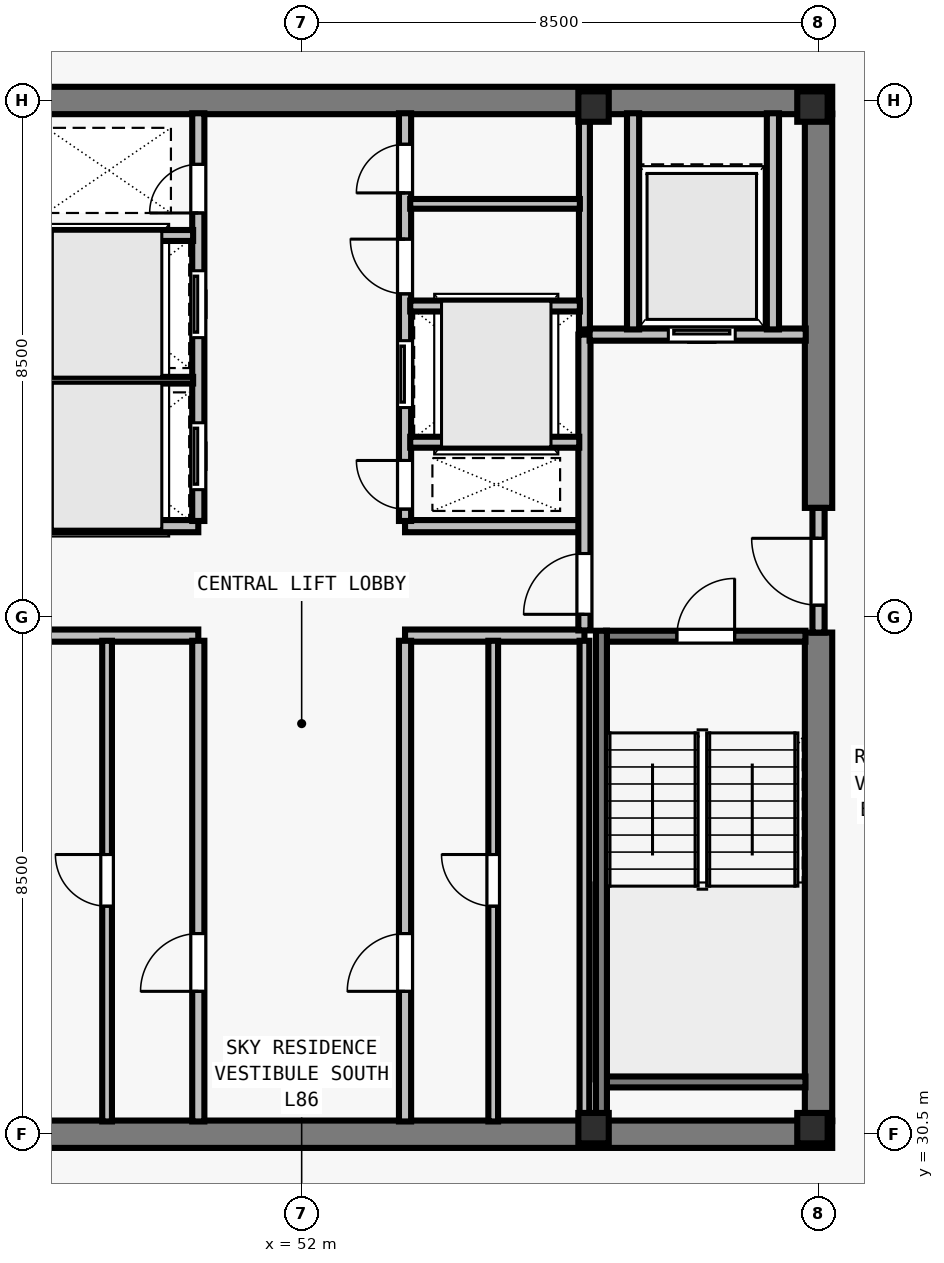
"""IFC4 building model, lengths in metres.
Left out: names, types, materials, properties, quantities, classifications, styles, units other than length and angle.
Written with IfcOpenShell. Run it as: python <this file> out.ifc"""

import sys

from ifc_helpers import new_model, si_unit, direction, frame, frame_2d, origin, origin_2d, place, context, subcontext, project, spatial, rectangle, i_section, extrude, element, fill, save


model = new_model("IFC4")
c1 = context("Model", 3, precision=1e-05, world=origin(), true_north=direction((0.0, 1.0)))
c2 = subcontext(c1, "Body", "Model", "MODEL_VIEW")
j1 = project(units=[si_unit("LENGTHUNIT", "METRE"), si_unit("PLANEANGLEUNIT", "RADIAN")], contexts=[c1])
p1 = place(None, origin())
s1 = spatial("IfcSite", under=j1, at=p1, CompositionType="ELEMENT")
p2 = place(p1, origin())
s2 = spatial("IfcBuilding", under=s1, at=p2, CompositionType="ELEMENT")
p3 = place(p2, frame((0.0, 0.0, 312.0)))
s3 = spatial("IfcBuildingStorey", under=s2, at=p3, CompositionType="ELEMENT", Elevation=312.0)
for number, where, z_axis, x_axis in (
    (1, (56.8, 30.6, 0.0), (0.0, 0.0, 1.0), (1.0, 0.0, 0.0)),
    (2, (60.4, 30.6, 0.0), (0.0, 0.0, 1.0), (1.0, 0.0, 0.0)),
    (3, (56.8, 47.4, 0.0), (0.0, 0.0, 1.0), (1.0, 0.0, 0.0)),
    (4, (60.4, 47.4, 0.0), (0.0, 0.0, 1.0), (1.0, 0.0, 0.0)),
):
    element("IfcColumn", number, at=place(p3, frame(where, z_axis=z_axis, x_axis=x_axis)), inside=s3, PredefinedType="COLUMN", context=c2, shape_type="SweptSolid", body=[
        extrude(i_section(OverallWidth=0.5, OverallDepth=0.5, WebThickness=0.028, FlangeThickness=0.045, at=origin_2d()), origin(), (0.0, 0.0, 1.0), 3.5),
    ])
for number, where, z_axis, x_axis in (
    (5, (43.275, 30.5, 0.0), (0.0, 0.0, 1.0), (1.0, 0.0, 0.0)),
    (6, (43.275, 47.5, 0.0), (0.0, 0.0, 1.0), (1.0, 0.0, 0.0)),
):
    element("IfcWall", number, at=place(p3, frame(where, z_axis=z_axis, x_axis=x_axis)), inside=s3, PredefinedType="SHEAR", context=c2, shape_type="SweptSolid", body=[
        extrude(rectangle(XDim=17.45, YDim=0.45, at=frame_2d((8.725, 0.0))), origin(), (0.0, 0.0, 1.0), 3.29),
    ])
p4 = place(p3, frame((60.5, 30.715, 0.0), z_axis=(0.0, 0.0, 1.0), x_axis=(0.0, 1.0, 0.0)))
e7 = element("IfcWall", 7, at=p4, inside=s3, PredefinedType="SHEAR", context=c2, shape_type="SweptSolid", body=[
    extrude(rectangle(XDim=8.035, YDim=0.45, at=frame_2d((4.018, 0.0))), origin(), (0.0, 0.0, 1.0), 3.29),
])
p5 = place(p3, frame((60.5, 40.8, 0.0), z_axis=(0.0, 0.0, 1.0), x_axis=(0.0, 1.0, 0.0)))
e8 = element("IfcWall", 8, at=p5, inside=s3, PredefinedType="SHEAR", context=c2, shape_type="SweptSolid", body=[
    extrude(rectangle(XDim=6.485, YDim=0.45, at=frame_2d((3.242, 0.0))), origin(), (0.0, 0.0, 1.0), 3.29),
])
for number, where, z_axis, x_axis in (
    (9, (47.35, 38.7, 0.0), (0.0, 0.0, 1.0), (1.0, 0.0, 0.0)),
    (10, (47.35, 40.5, 0.0), (0.0, 0.0, 1.0), (1.0, 0.0, 0.0)),
    (11, (53.7, 38.7, 0.0), (0.0, 0.0, 1.0), (1.0, 0.0, 0.0)),
    (12, (53.7, 40.5, 0.0), (0.0, 0.0, 1.0), (1.0, 0.0, 0.0)),
):
    element("IfcWall", number, at=place(p3, frame(where, z_axis=z_axis, x_axis=x_axis)), inside=s3, PredefinedType="SOLIDWALL", context=c2, shape_type="SweptSolid", body=[
        extrude(rectangle(XDim=2.95, YDim=0.2, at=frame_2d((1.475, 0.0))), origin(), (0.0, 0.0, 1.0), 3.29),
    ])
p6 = place(p3, frame((50.3, 30.71, 0.0), z_axis=(0.0, 0.0, 1.0), x_axis=(0.0, 1.0, 0.0)))
e13 = element("IfcWall", 13, at=p6, inside=s3, PredefinedType="SOLIDWALL", context=c2, shape_type="SweptSolid", body=[
    extrude(rectangle(XDim=7.905, YDim=0.2, at=frame_2d((3.953, 0.0))), origin(), (0.0, 0.0, 1.0), 3.29),
])
p7 = place(p6, frame((2.14, 0.0, 0.0)))
e14 = element("IfcOpeningElement", 14, at=p7, cuts=e13, PredefinedType="OPENING", context=c2, shape_type="SweptSolid", body=[
    extrude(rectangle(XDim=0.95, YDim=2.12, at=frame_2d((0.475, 1.06))), frame((0.0, 0.11, 0.0), z_axis=(0.0, -1.0, 0.0), x_axis=(1.0, 0.0, 0.0)), (0.0, 0.0, 1.0), 0.22),
])
p8 = place(p3, frame((53.7, 30.71, 0.0), z_axis=(0.0, 0.0, 1.0), x_axis=(0.0, 1.0, 0.0)))
e15 = element("IfcWall", 15, at=p8, inside=s3, PredefinedType="SOLIDWALL", context=c2, shape_type="SweptSolid", body=[
    extrude(rectangle(XDim=7.905, YDim=0.2, at=frame_2d((3.953, 0.0))), origin(), (0.0, 0.0, 1.0), 3.29),
])
p9 = place(p8, frame((2.14, 0.0, 0.0)))
e16 = element("IfcOpeningElement", 16, at=p9, cuts=e15, PredefinedType="OPENING", context=c2, shape_type="SweptSolid", body=[
    extrude(rectangle(XDim=0.95, YDim=2.12, at=frame_2d((0.475, 1.06))), frame((0.0, 0.11, 0.0), z_axis=(0.0, -1.0, 0.0), x_axis=(1.0, 0.0, 0.0)), (0.0, 0.0, 1.0), 0.22),
])
p10 = place(p3, frame((50.3, 40.585, 0.0), z_axis=(0.0, 0.0, 1.0), x_axis=(0.0, 1.0, 0.0)))
e17 = element("IfcWall", 17, at=p10, inside=s3, PredefinedType="SOLIDWALL", context=c2, shape_type="SweptSolid", body=[
    extrude(rectangle(XDim=6.705, YDim=0.2, at=frame_2d((3.353, 0.0))), origin(), (0.0, 0.0, 1.0), 3.29),
])
p11 = place(p10, frame((0.515, 0.0, 0.0)))
e18 = element("IfcOpeningElement", 18, at=p11, cuts=e17, PredefinedType="OPENING", context=c2, shape_type="SweptSolid", body=[
    extrude(rectangle(XDim=1.1, YDim=2.2, at=frame_2d((0.55, 1.1))), frame((0.0, 0.11, 0.0), z_axis=(0.0, -1.0, 0.0), x_axis=(1.0, 0.0, 0.0)), (0.0, 0.0, 1.0), 0.22),
])
p12 = place(p10, frame((3.015, 0.0, 0.0)))
e19 = element("IfcOpeningElement", 19, at=p12, cuts=e17, PredefinedType="OPENING", context=c2, shape_type="SweptSolid", body=[
    extrude(rectangle(XDim=1.1, YDim=2.2, at=frame_2d((0.55, 1.1))), frame((0.0, 0.11, 0.0), z_axis=(0.0, -1.0, 0.0), x_axis=(1.0, 0.0, 0.0)), (0.0, 0.0, 1.0), 0.22),
])
p13 = place(p10, frame((5.065, 0.0, 0.0)))
e20 = element("IfcOpeningElement", 20, at=p13, cuts=e17, PredefinedType="OPENING", context=c2, shape_type="SweptSolid", body=[
    extrude(rectangle(XDim=0.8, YDim=2.08, at=frame_2d((0.4, 1.04))), frame((0.0, 0.11, 0.0), z_axis=(0.0, -1.0, 0.0), x_axis=(1.0, 0.0, 0.0)), (0.0, 0.0, 1.0), 0.22),
])
p14 = place(p3, frame((53.7, 40.585, 0.0), z_axis=(0.0, 0.0, 1.0), x_axis=(0.0, 1.0, 0.0)))
e21 = element("IfcWall", 21, at=p14, inside=s3, PredefinedType="SOLIDWALL", context=c2, shape_type="SweptSolid", body=[
    extrude(rectangle(XDim=6.705, YDim=0.2, at=frame_2d((3.353, 0.0))), origin(), (0.0, 0.0, 1.0), 3.29),
])
p15 = place(p14, frame((0.195, 0.0, 0.0)))
e22 = element("IfcOpeningElement", 22, at=p15, cuts=e21, PredefinedType="OPENING", context=c2, shape_type="SweptSolid", body=[
    extrude(rectangle(XDim=0.8, YDim=2.08, at=frame_2d((0.4, 1.04))), frame((0.0, 0.11, 0.0), z_axis=(0.0, -1.0, 0.0), x_axis=(1.0, 0.0, 0.0)), (0.0, 0.0, 1.0), 0.22),
])
p16 = place(p14, frame((1.865, 0.0, 0.0)))
e23 = element("IfcOpeningElement", 23, at=p16, cuts=e21, PredefinedType="OPENING", context=c2, shape_type="SweptSolid", body=[
    extrude(rectangle(XDim=1.1, YDim=2.2, at=frame_2d((0.55, 1.1))), frame((0.0, 0.11, 0.0), z_axis=(0.0, -1.0, 0.0), x_axis=(1.0, 0.0, 0.0)), (0.0, 0.0, 1.0), 0.22),
])
p17 = place(p14, frame((3.735, 0.0, 0.0)))
e24 = element("IfcOpeningElement", 24, at=p17, cuts=e21, PredefinedType="OPENING", context=c2, shape_type="SweptSolid", body=[
    extrude(rectangle(XDim=0.9, YDim=2.12, at=frame_2d((0.45, 1.06))), frame((0.0, 0.11, 0.0), z_axis=(0.0, -1.0, 0.0), x_axis=(1.0, 0.0, 0.0)), (0.0, 0.0, 1.0), 0.22),
])
p18 = place(p14, frame((5.395, 0.0, 0.0)))
e25 = element("IfcOpeningElement", 25, at=p18, cuts=e21, PredefinedType="OPENING", context=c2, shape_type="SweptSolid", body=[
    extrude(rectangle(XDim=0.8, YDim=2.1, at=frame_2d((0.4, 1.05))), frame((0.0, 0.11, 0.0), z_axis=(0.0, -1.0, 0.0), x_axis=(1.0, 0.0, 0.0)), (0.0, 0.0, 1.0), 0.22),
])
p19 = place(p3, frame((60.5, 38.75, 0.0), z_axis=(0.0, 0.0, 1.0), x_axis=(0.0, 1.0, 0.0)))
e26 = element("IfcWall", 26, at=p19, inside=s3, PredefinedType="SOLIDWALL", context=c2, shape_type="SweptSolid", body=[
    extrude(rectangle(XDim=2.05, YDim=0.2, at=frame_2d((1.025, 0.0))), origin(), (0.0, 0.0, 1.0), 3.29),
])
p20 = place(p19, frame((0.45, 0.0, 0.0)))
e27 = element("IfcOpeningElement", 27, at=p20, cuts=e26, PredefinedType="OPENING", context=c2, shape_type="SweptSolid", body=[
    extrude(rectangle(XDim=1.1, YDim=2.15, at=frame_2d((0.55, 1.075))), frame((0.0, 0.11, 0.0), z_axis=(0.0, -1.0, 0.0), x_axis=(1.0, 0.0, 0.0)), (0.0, 0.0, 1.0), 0.22),
])
p21 = place(p3, frame((56.65, 38.785, 0.0), z_axis=(0.0, 0.0, 1.0), x_axis=(0.0, 1.0, 0.0)))
e28 = element("IfcWall", 28, at=p21, inside=s3, PredefinedType="SOLIDWALL", context=c2, shape_type="SweptSolid", body=[
    extrude(rectangle(XDim=4.865, YDim=0.2, at=frame_2d((2.433, 0.0))), origin(), (0.0, 0.0, 1.0), 3.29),
])
p22 = place(p21, frame((0.265, 0.0, 0.0)))
e29 = element("IfcOpeningElement", 29, at=p22, cuts=e28, PredefinedType="OPENING", context=c2, shape_type="SweptSolid", body=[
    extrude(rectangle(XDim=1.0, YDim=2.15, at=frame_2d((0.5, 1.075))), frame((0.0, 0.11, 0.0), z_axis=(0.0, -1.0, 0.0), x_axis=(1.0, 0.0, 0.0)), (0.0, 0.0, 1.0), 0.22),
])
p23 = place(p3, frame((56.735, 43.65, 0.0), z_axis=(0.0, 0.0, 1.0), x_axis=(1.0, 0.0, 0.0)))
e30 = element("IfcWall", 30, at=p23, inside=s3, PredefinedType="SOLIDWALL", context=c2, shape_type="SweptSolid", body=[
    extrude(rectangle(XDim=3.555, YDim=0.2, at=frame_2d((1.777, 0.0))), origin(), (0.0, 0.0, 1.0), 3.29),
])
p24 = place(p23, frame((1.295, 0.0, 0.0)))
e31 = element("IfcOpeningElement", 31, at=p24, cuts=e30, PredefinedType="OPENING", context=c2, shape_type="SweptSolid", body=[
    extrude(rectangle(XDim=1.1, YDim=2.2, at=frame_2d((0.55, 1.1))), frame((0.0, 0.11, 0.0), z_axis=(0.0, -1.0, 0.0), x_axis=(1.0, 0.0, 0.0)), (0.0, 0.0, 1.0), 0.22),
])
for number, where, z_axis, x_axis in (
    (32, (57.45, 43.735, 0.0), (0.0, 0.0, 1.0), (0.0, 1.0, 0.0)),
    (33, (59.75, 43.735, 0.0), (0.0, 0.0, 1.0), (0.0, 1.0, 0.0)),
):
    element("IfcWall", number, at=place(p3, frame(where, z_axis=z_axis, x_axis=x_axis)), inside=s3, PredefinedType="SOLIDWALL", context=c2, shape_type="SweptSolid", body=[
        extrude(rectangle(XDim=3.555, YDim=0.2, at=frame_2d((1.777, 0.0))), origin(), (0.0, 0.0, 1.0), 3.29),
    ])
p25 = place(p3, frame((48.8, 30.71, 0.0), z_axis=(0.0, 0.0, 1.0), x_axis=(0.0, 1.0, 0.0)))
e34 = element("IfcWall", 34, at=p25, inside=s3, PredefinedType="PARTITIONING", context=c2, shape_type="SweptSolid", body=[
    extrude(rectangle(XDim=7.905, YDim=0.16, at=frame_2d((3.953, 0.0))), origin(), (0.0, 0.0, 1.0), 3.29),
])
p26 = place(p25, frame((3.54, 0.0, 0.0)))
e35 = element("IfcOpeningElement", 35, at=p26, cuts=e34, PredefinedType="OPENING", context=c2, shape_type="SweptSolid", body=[
    extrude(rectangle(XDim=0.85, YDim=2.12, at=frame_2d((0.425, 1.06))), frame((0.0, 0.09, 0.0), z_axis=(0.0, -1.0, 0.0), x_axis=(1.0, 0.0, 0.0)), (0.0, 0.0, 1.0), 0.18),
])
p27 = place(p3, frame((56.65, 30.71, 0.0), z_axis=(0.0, 0.0, 1.0), x_axis=(0.0, 1.0, 0.0)))
e36 = element("IfcWall", 36, at=p27, inside=s3, PredefinedType="PARTITIONING", context=c2, shape_type="SweptSolid", body=[
    extrude(rectangle(XDim=7.905, YDim=0.16, at=frame_2d((3.953, 0.0))), origin(), (0.0, 0.0, 1.0), 3.29),
])
p28 = place(p3, frame((55.15, 30.71, 0.0), z_axis=(0.0, 0.0, 1.0), x_axis=(0.0, 1.0, 0.0)))
e37 = element("IfcWall", 37, at=p28, inside=s3, PredefinedType="PARTITIONING", context=c2, shape_type="SweptSolid", body=[
    extrude(rectangle(XDim=7.905, YDim=0.16, at=frame_2d((3.953, 0.0))), origin(), (0.0, 0.0, 1.0), 3.29),
])
p29 = place(p28, frame((3.54, 0.0, 0.0)))
e38 = element("IfcOpeningElement", 38, at=p29, cuts=e37, PredefinedType="OPENING", context=c2, shape_type="SweptSolid", body=[
    extrude(rectangle(XDim=0.85, YDim=2.12, at=frame_2d((0.425, 1.06))), frame((0.0, 0.09, 0.0), z_axis=(0.0, -1.0, 0.0), x_axis=(1.0, 0.0, 0.0)), (0.0, 0.0, 1.0), 0.18),
])
p30 = place(p3, frame((47.435, 42.9, 0.0), z_axis=(0.0, 0.0, 1.0), x_axis=(1.0, 0.0, 0.0)))
e39 = element("IfcWall", 39, at=p30, inside=s3, PredefinedType="PARTITIONING", context=c2, shape_type="SweptSolid", body=[
    extrude(rectangle(XDim=2.78, YDim=0.11, at=frame_2d((1.39, 0.0))), origin(), (0.0, 0.0, 1.0), 3.29),
])
p31 = place(p3, frame((47.425, 45.28, 0.0), z_axis=(0.0, 0.0, 1.0), x_axis=(1.0, 0.0, 0.0)))
e40 = element("IfcWall", 40, at=p31, inside=s3, PredefinedType="SOLIDWALL", context=c2, shape_type="SweptSolid", body=[
    extrude(rectangle(XDim=2.79, YDim=0.18, at=frame_2d((1.395, 0.0))), origin(), (0.0, 0.0, 1.0), 3.29),
])
p32 = place(p3, frame((56.65, 43.735, 0.0), z_axis=(0.0, 0.0, 1.0), x_axis=(0.0, 1.0, 0.0)))
e41 = element("IfcWall", 41, at=p32, inside=s3, PredefinedType="SOLIDWALL", context=c2, shape_type="SweptSolid", body=[
    extrude(rectangle(XDim=3.555, YDim=0.18, at=frame_2d((1.777, 0.0))), origin(), (0.0, 0.0, 1.0), 3.29),
])
p33 = place(p3, frame((53.785, 41.88, 0.0), z_axis=(0.0, 0.0, 1.0), x_axis=(1.0, 0.0, 0.0)))
e42 = element("IfcWall", 42, at=p33, inside=s3, PredefinedType="SOLIDWALL", context=c2, shape_type="SweptSolid", body=[
    extrude(rectangle(XDim=2.78, YDim=0.18, at=frame_2d((1.39, 0.0))), origin(), (0.0, 0.0, 1.0), 3.29),
])
p34 = place(p3, frame((53.785, 44.12, 0.0), z_axis=(0.0, 0.0, 1.0), x_axis=(1.0, 0.0, 0.0)))
e43 = element("IfcWall", 43, at=p34, inside=s3, PredefinedType="SOLIDWALL", context=c2, shape_type="SweptSolid", body=[
    extrude(rectangle(XDim=2.79, YDim=0.18, at=frame_2d((1.395, 0.0))), origin(), (0.0, 0.0, 1.0), 3.29),
])
p35 = place(p3, frame((53.785, 45.8, 0.0), z_axis=(0.0, 0.0, 1.0), x_axis=(1.0, 0.0, 0.0)))
e44 = element("IfcWall", 44, at=p35, inside=s3, PredefinedType="PARTITIONING", context=c2, shape_type="SweptSolid", body=[
    extrude(rectangle(XDim=2.79, YDim=0.16, at=frame_2d((1.395, 0.0))), origin(), (0.0, 0.0, 1.0), 3.29),
])
p36 = place(p3, frame((57.005, 38.69, 0.0), z_axis=(0.0, 0.0, 1.0), x_axis=(1.0, 0.0, 0.0)))
e45 = element("IfcWall", 45, at=p36, inside=s3, PredefinedType="SOLIDWALL", context=c2, shape_type="SweptSolid", body=[
    extrude(rectangle(XDim=3.28, YDim=0.18, at=frame_2d((1.64, 0.0))), origin(), (0.0, 0.0, 1.0), 3.29),
])
p37 = place(p36, frame((1.165, 0.0, 0.0)))
e46 = element("IfcOpeningElement", 46, at=p37, cuts=e45, PredefinedType="OPENING", context=c2, shape_type="SweptSolid", body=[
    extrude(rectangle(XDim=0.95, YDim=2.15, at=frame_2d((0.475, 1.075))), frame((0.0, 0.1, 0.0), z_axis=(0.0, -1.0, 0.0), x_axis=(1.0, 0.0, 0.0)), (0.0, 0.0, 1.0), 0.2),
])
p38 = place(p3, frame((57.005, 31.36, 0.0), z_axis=(0.0, 0.0, 1.0), x_axis=(1.0, 0.0, 0.0)))
e47 = element("IfcWall", 47, at=p38, inside=s3, PredefinedType="SOLIDWALL", context=c2, shape_type="SweptSolid", body=[
    extrude(rectangle(XDim=3.28, YDim=0.18, at=frame_2d((1.64, 0.0))), origin(), (0.0, 0.0, 1.0), 3.29),
])
p39 = place(p3, frame((56.93, 38.78, 0.0), z_axis=(0.0, 0.0, 1.0), x_axis=(0.0, -1.0, 0.0)))
e48 = element("IfcWall", 48, at=p39, inside=s3, PredefinedType="SOLIDWALL", context=c2, shape_type="SweptSolid", body=[
    extrude(rectangle(XDim=8.067, YDim=0.18, at=frame_2d((4.034, 0.0))), origin(), (0.0, 0.0, 1.0), 3.29),
])
p40 = place(p20, origin())
e49 = element("IfcDoor", 49, at=p40, inside=s3, OperationType="SINGLE_SWING_RIGHT", PredefinedType="DOOR", context=c2, shape_type="SweptSolid", body=[
    extrude(rectangle(XDim=1.1, YDim=2.15, at=frame_2d((0.55, 1.075))), frame((0.0, 0.025, 0.0), z_axis=(0.0, -1.0, 0.0), x_axis=(1.0, 0.0, 0.0)), (0.0, 0.0, 1.0), 0.05),
])
fill(e27, e49)
p41 = place(p22, origin())
e50 = element("IfcDoor", 50, at=p41, inside=s3, OperationType="SINGLE_SWING_LEFT", PredefinedType="DOOR", context=c2, shape_type="SweptSolid", body=[
    extrude(rectangle(XDim=1.0, YDim=2.15, at=frame_2d((0.5, 1.075))), frame((0.0, 0.025, 0.0), z_axis=(0.0, -1.0, 0.0), x_axis=(1.0, 0.0, 0.0)), (0.0, 0.0, 1.0), 0.05),
])
fill(e29, e50)
p42 = place(p24, origin())
e51 = element("IfcDoor", 51, at=p42, inside=s3, OperationType="SLIDING_TO_LEFT", PredefinedType="DOOR", context=c2, shape_type="SweptSolid", body=[
    extrude(rectangle(XDim=1.1, YDim=2.2, at=frame_2d((0.55, 1.1))), frame((0.0, 0.025, 0.0), z_axis=(0.0, -1.0, 0.0), x_axis=(1.0, 0.0, 0.0)), (0.0, 0.0, 1.0), 0.05),
])
fill(e31, e51)
p43 = place(p7, origin())
e52 = element("IfcDoor", 52, at=p43, inside=s3, OperationType="SINGLE_SWING_LEFT", PredefinedType="DOOR", context=c2, shape_type="SweptSolid", body=[
    extrude(rectangle(XDim=0.95, YDim=2.12, at=frame_2d((0.475, 1.06))), frame((0.0, 0.025, 0.0), z_axis=(0.0, -1.0, 0.0), x_axis=(1.0, 0.0, 0.0)), (0.0, 0.0, 1.0), 0.05),
])
fill(e14, e52)
p44 = place(p26, origin())
e53 = element("IfcDoor", 53, at=p44, inside=s3, OperationType="SINGLE_SWING_RIGHT", PredefinedType="DOOR", context=c2, shape_type="SweptSolid", body=[
    extrude(rectangle(XDim=0.85, YDim=2.12, at=frame_2d((0.425, 1.06))), frame((0.0, 0.025, 0.0), z_axis=(0.0, -1.0, 0.0), x_axis=(1.0, 0.0, 0.0)), (0.0, 0.0, 1.0), 0.05),
])
fill(e35, e53)
p45 = place(p9, origin())
e54 = element("IfcDoor", 54, at=p45, inside=s3, OperationType="SINGLE_SWING_LEFT", PredefinedType="DOOR", context=c2, shape_type="SweptSolid", body=[
    extrude(rectangle(XDim=0.95, YDim=2.12, at=frame_2d((0.475, 1.06))), frame((0.0, 0.025, 0.0), z_axis=(0.0, -1.0, 0.0), x_axis=(1.0, 0.0, 0.0)), (0.0, 0.0, 1.0), 0.05),
])
fill(e16, e54)
p46 = place(p29, origin())
e55 = element("IfcDoor", 55, at=p46, inside=s3, OperationType="SINGLE_SWING_RIGHT", PredefinedType="DOOR", context=c2, shape_type="SweptSolid", body=[
    extrude(rectangle(XDim=0.85, YDim=2.12, at=frame_2d((0.425, 1.06))), frame((0.0, 0.025, 0.0), z_axis=(0.0, -1.0, 0.0), x_axis=(1.0, 0.0, 0.0)), (0.0, 0.0, 1.0), 0.05),
])
fill(e38, e55)
p47 = place(p11, origin())
e56 = element("IfcDoor", 56, at=p47, inside=s3, OperationType="SLIDING_TO_LEFT", PredefinedType="DOOR", context=c2, shape_type="SweptSolid", body=[
    extrude(rectangle(XDim=1.1, YDim=2.2, at=frame_2d((0.55, 1.1))), frame((0.0, 0.025, 0.0), z_axis=(0.0, -1.0, 0.0), x_axis=(1.0, 0.0, 0.0)), (0.0, 0.0, 1.0), 0.05),
])
fill(e18, e56)
p48 = place(p12, origin())
e57 = element("IfcDoor", 57, at=p48, inside=s3, OperationType="SLIDING_TO_LEFT", PredefinedType="DOOR", context=c2, shape_type="SweptSolid", body=[
    extrude(rectangle(XDim=1.1, YDim=2.2, at=frame_2d((0.55, 1.1))), frame((0.0, 0.025, 0.0), z_axis=(0.0, -1.0, 0.0), x_axis=(1.0, 0.0, 0.0)), (0.0, 0.0, 1.0), 0.05),
])
fill(e19, e57)
p49 = place(p13, origin())
e58 = element("IfcDoor", 58, at=p49, inside=s3, OperationType="SINGLE_SWING_LEFT", PredefinedType="DOOR", context=c2, shape_type="SweptSolid", body=[
    extrude(rectangle(XDim=0.8, YDim=2.08, at=frame_2d((0.4, 1.04))), frame((0.0, 0.025, 0.0), z_axis=(0.0, -1.0, 0.0), x_axis=(1.0, 0.0, 0.0)), (0.0, 0.0, 1.0), 0.05),
])
fill(e20, e58)
p50 = place(p15, origin())
e59 = element("IfcDoor", 59, at=p50, inside=s3, OperationType="SINGLE_SWING_RIGHT", PredefinedType="DOOR", context=c2, shape_type="SweptSolid", body=[
    extrude(rectangle(XDim=0.8, YDim=2.08, at=frame_2d((0.4, 1.04))), frame((0.0, 0.025, 0.0), z_axis=(0.0, -1.0, 0.0), x_axis=(1.0, 0.0, 0.0)), (0.0, 0.0, 1.0), 0.05),
])
fill(e22, e59)
p51 = place(p16, origin())
e60 = element("IfcDoor", 60, at=p51, inside=s3, OperationType="SLIDING_TO_LEFT", PredefinedType="DOOR", context=c2, shape_type="SweptSolid", body=[
    extrude(rectangle(XDim=1.1, YDim=2.2, at=frame_2d((0.55, 1.1))), frame((0.0, 0.025, 0.0), z_axis=(0.0, -1.0, 0.0), x_axis=(1.0, 0.0, 0.0)), (0.0, 0.0, 1.0), 0.05),
])
fill(e23, e60)
p52 = place(p17, origin())
e61 = element("IfcDoor", 61, at=p52, inside=s3, OperationType="SINGLE_SWING_RIGHT", PredefinedType="DOOR", context=c2, shape_type="SweptSolid", body=[
    extrude(rectangle(XDim=0.9, YDim=2.12, at=frame_2d((0.45, 1.06))), frame((0.0, 0.025, 0.0), z_axis=(0.0, -1.0, 0.0), x_axis=(1.0, 0.0, 0.0)), (0.0, 0.0, 1.0), 0.05),
])
fill(e24, e61)
p53 = place(p18, origin())
e62 = element("IfcDoor", 62, at=p53, inside=s3, OperationType="SINGLE_SWING_LEFT", PredefinedType="DOOR", context=c2, shape_type="SweptSolid", body=[
    extrude(rectangle(XDim=0.8, YDim=2.1, at=frame_2d((0.4, 1.05))), frame((0.0, 0.025, 0.0), z_axis=(0.0, -1.0, 0.0), x_axis=(1.0, 0.0, 0.0)), (0.0, 0.0, 1.0), 0.05),
])
fill(e25, e62)
p54 = place(p37, origin())
e63 = element("IfcDoor", 63, at=p54, inside=s3, OperationType="SINGLE_SWING_RIGHT", PredefinedType="DOOR", context=c2, shape_type="SweptSolid", body=[
    extrude(rectangle(XDim=0.95, YDim=2.15, at=frame_2d((0.475, 1.075))), frame((0.0, 0.025, 0.0), z_axis=(0.0, -1.0, 0.0), x_axis=(1.0, 0.0, 0.0)), (0.0, 0.0, 1.0), 0.05),
])
fill(e46, e63)
save(model, sys.argv[1])
